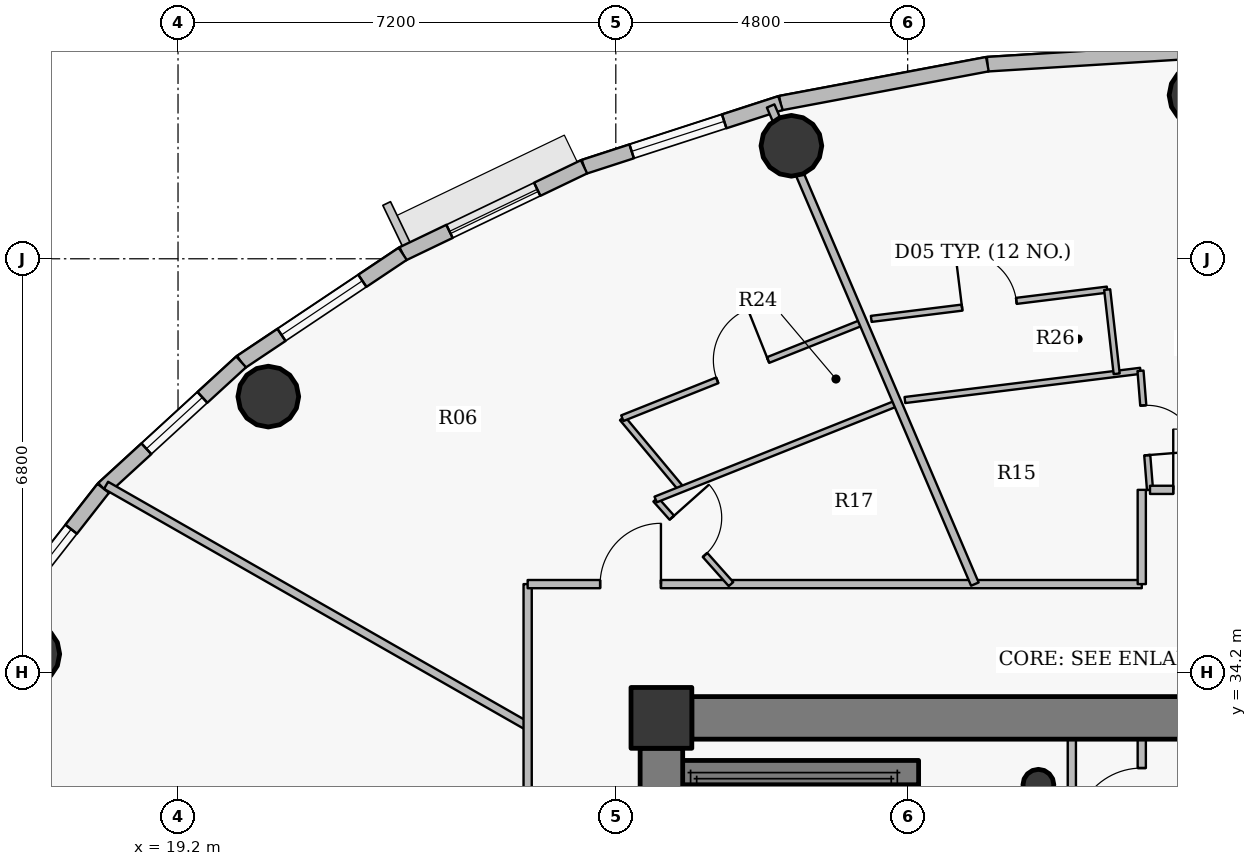
"""IFC4 building model, lengths in metres.
Left out: names, types, materials, properties, quantities, classifications, styles, units other than length and angle.
Written with IfcOpenShell. Run it as: python <this file> out.ifc"""

import sys

from ifc_helpers import new_model, si_unit, direction, frame, frame_2d, origin, origin_2d, place, context, subcontext, project, spatial, rectangle, hollow_circle, extrude, source, transform, mapped, element, fill, save


model = new_model("IFC4")
c1 = context("Model", 3, precision=1e-05, world=origin(), true_north=direction((0.0, 1.0)))
c2 = subcontext(c1, "Body", "Model", "MODEL_VIEW")
j1 = project(units=[si_unit("LENGTHUNIT", "METRE"), si_unit("PLANEANGLEUNIT", "RADIAN")], contexts=[c1])
p1 = place(None, origin())
s1 = spatial("IfcSite", under=j1, at=p1, CompositionType="ELEMENT")
p2 = place(p1, origin())
s2 = spatial("IfcBuilding", under=s1, at=p2, CompositionType="ELEMENT")
p3 = place(p2, frame((0.0, 0.0, 303.0)))
s3 = spatial("IfcBuildingStorey", under=s2, at=p3, CompositionType="ELEMENT", Elevation=303.0)
p4 = place(p3, frame((27.15, 33.45, 0.0), z_axis=(0.0, 0.0, 1.0), x_axis=(1.0, 0.0, 0.0)))
e1 = element("IfcColumn", 1, at=p4, inside=s3, PredefinedType="COLUMN", context=c2, shape_type="SweptSolid", body=[
    extrude(rectangle(XDim=1.0, YDim=1.0, at=origin_2d()), origin(), (0.0, 0.0, 1.0), 3.75),
])
p5 = place(p3, frame((33.35, 32.35, 0.0), z_axis=(0.0, 0.0, 1.0), x_axis=(1.0, 0.0, 0.0)))
e2 = element("IfcColumn", 2, at=p5, inside=s3, PredefinedType="COLUMN", context=c2, shape_type="SweptSolid", body=[
    extrude(hollow_circle(Radius=0.254, WallThickness=0.02, at=origin_2d()), origin(), (0.0, 0.0, 1.0), 3.75),
])
p6 = place(p3, frame((31.18, 27.8, 0.0), z_axis=(0.0, 0.0, 1.0), x_axis=(0.0, 1.0, 0.0)))
e3 = element("IfcWall", 3, at=p6, inside=s3, PredefinedType="SHEAR", context=c2, shape_type="SweptSolid", body=[
    extrude(rectangle(XDim=4.75, YDim=0.4, at=frame_2d((2.375, 0.0))), origin(), (0.0, 0.0, 1.0), 3.75),
])
p7 = place(p3, frame((27.25, 32.55, 0.0), z_axis=(0.0, 0.0, 1.0), x_axis=(1.0, 0.0, 0.0)))
e4 = element("IfcWall", 4, at=p7, inside=s3, PredefinedType="SHEAR", context=c2, shape_type="SweptSolid", body=[
    extrude(rectangle(XDim=4.13, YDim=0.4, at=frame_2d((2.065, 0.0))), origin(), (0.0, 0.0, 1.0), 3.75),
])
p8 = place(p3, frame((27.65, 33.45, 0.0), z_axis=(0.0, 0.0, 1.0), x_axis=(1.0, 0.0, 0.0)))
e5 = element("IfcWall", 5, at=p8, inside=s3, PredefinedType="SHEAR", context=c2, shape_type="SweptSolid", body=[
    extrude(rectangle(XDim=16.7, YDim=0.7, at=frame_2d((8.35, 0.0))), origin(), (0.0, 0.0, 1.0), 3.05),
])
p9 = place(p8, frame((12.775, 0.0, 0.0)))
e6 = element("IfcOpeningElement", 6, at=p9, cuts=e5, PredefinedType="OPENING", context=c2, shape_type="SweptSolid", body=[
    extrude(rectangle(XDim=1.15, YDim=2.15, at=origin_2d()), frame((0.575, 0.36, 1.075), z_axis=(0.0, -1.0, 0.0), x_axis=(1.0, 0.0, 0.0)), (0.0, 0.0, 1.0), 0.72),
])
p10 = place(p3, frame((27.15, 21.05, 0.0), z_axis=(0.0, 0.0, 1.0), x_axis=(0.0, 1.0, 0.0)))
e7 = element("IfcWall", 7, at=p10, inside=s3, PredefinedType="SHEAR", context=c2, shape_type="SweptSolid", body=[
    extrude(rectangle(XDim=11.9, YDim=0.7, at=frame_2d((5.95, 0.0))), origin(), (0.0, 0.0, 1.0), 3.05),
])
for number, where, z_axis, x_axis in (
    (8, (36.0, 43.69, 0.0), (0.0, 0.0, 1.0), (1.0, 0.0, 0.0)),
    (9, (29.288, 42.858, 0.0), (0.0, 0.0, 1.0), (1.0, 0.0, 0.0)),
    (10, (20.685, 38.733, 0.0), (0.0, 0.0, 1.0), (1.0, 0.0, 0.0)),
    (11, (16.754, 34.5, 0.0), (0.0, 0.0, 1.0), (1.0, 0.0, 0.0)),
):
    element("IfcColumn", number, at=place(p3, frame(where, z_axis=z_axis, x_axis=x_axis)), inside=s3, PredefinedType="COLUMN", context=c2, shape_type="SweptSolid", body=[
        extrude(hollow_circle(Radius=0.5, WallThickness=0.032, at=origin_2d()), origin(), (0.0, 0.0, 1.0), 3.75),
    ])
p11 = place(p3, frame((32.511, 44.2, 0.0), z_axis=(0.0, 0.0, 1.0), x_axis=(0.998104946479, 0.061534671648, 0.0)))
e12 = element("IfcWall", 12, at=p11, inside=s3, PredefinedType="SOLIDWALL", context=c2, shape_type="SweptSolid", body=[
    extrude(rectangle(XDim=3.495, YDim=0.24, at=frame_2d((1.748, 0.0))), origin(), (0.0, 0.0, 1.0), 3.5),
])
p12 = place(p3, frame((29.109, 43.56, 0.0), z_axis=(0.0, 0.0, 1.0), x_axis=(0.982782655757, 0.184765395959, 0.0)))
e13 = element("IfcWall", 13, at=p12, inside=s3, PredefinedType="SOLIDWALL", context=c2, shape_type="SweptSolid", body=[
    extrude(rectangle(XDim=3.462, YDim=0.24, at=frame_2d((1.731, 0.0))), origin(), (0.0, 0.0, 1.0), 3.5),
])
p13 = place(p3, frame((25.877, 42.512, 0.0), z_axis=(0.0, 0.0, 1.0), x_axis=(0.95123136723, 0.308478339592, 0.0)))
e14 = element("IfcWall", 14, at=p13, inside=s3, PredefinedType="SOLIDWALL", context=c2, shape_type="SweptSolid", body=[
    extrude(rectangle(XDim=3.398, YDim=0.24, at=frame_2d((1.699, 0.0))), origin(), (0.0, 0.0, 1.0), 3.5),
])
p14 = place(p13, frame((0.824, 0.0, 0.9)))
e15 = element("IfcOpeningElement", 15, at=p14, cuts=e14, PredefinedType="OPENING", context=c2, shape_type="SweptSolid", body=[
    extrude(rectangle(XDim=1.6, YDim=1.75, at=origin_2d()), frame((0.8, 0.13, 0.875), z_axis=(0.0, -1.0, 0.0), x_axis=(1.0, 0.0, 0.0)), (0.0, 0.0, 1.0), 0.26),
])
p15 = place(p3, frame((22.896, 41.082, 0.0), z_axis=(0.0, 0.0, 1.0), x_axis=(0.901573741254, 0.43262546051, 0.0)))
e16 = element("IfcWall", 16, at=p15, inside=s3, PredefinedType="SOLIDWALL", context=c2, shape_type="SweptSolid", body=[
    extrude(rectangle(XDim=3.307, YDim=0.24, at=frame_2d((1.653, 0.0))), origin(), (0.0, 0.0, 1.0), 3.5),
])
p16 = place(p15, frame((0.854, 0.0, 0.9)))
e17 = element("IfcOpeningElement", 17, at=p16, cuts=e16, PredefinedType="OPENING", context=c2, shape_type="SweptSolid", body=[
    extrude(rectangle(XDim=1.6, YDim=1.75, at=origin_2d()), frame((0.8, 0.13, 0.875), z_axis=(0.0, -1.0, 0.0), x_axis=(1.0, 0.0, 0.0)), (0.0, 0.0, 1.0), 0.26),
])
p17 = place(p3, frame((20.238, 39.304, 0.0), z_axis=(0.0, 0.0, 1.0), x_axis=(0.831250592635, 0.55589787933, 0.0)))
e18 = element("IfcWall", 18, at=p17, inside=s3, PredefinedType="SOLIDWALL", context=c2, shape_type="SweptSolid", body=[
    extrude(rectangle(XDim=3.197, YDim=0.24, at=frame_2d((1.599, 0.0))), origin(), (0.0, 0.0, 1.0), 3.5),
])
p18 = place(p17, frame((0.799, 0.0, 0.9)))
e19 = element("IfcOpeningElement", 19, at=p18, cuts=e18, PredefinedType="OPENING", context=c2, shape_type="SweptSolid", body=[
    extrude(rectangle(XDim=1.6, YDim=1.75, at=origin_2d()), frame((0.8, 0.13, 0.875), z_axis=(0.0, -1.0, 0.0), x_axis=(1.0, 0.0, 0.0)), (0.0, 0.0, 1.0), 0.26),
])
p19 = place(p3, frame((17.97, 37.225, 0.0), z_axis=(0.0, 0.0, 1.0), x_axis=(0.737068506972, 0.675818034703, 0.0)))
e20 = element("IfcWall", 20, at=p19, inside=s3, PredefinedType="SOLIDWALL", context=c2, shape_type="SweptSolid", body=[
    extrude(rectangle(XDim=3.077, YDim=0.24, at=frame_2d((1.539, 0.0))), origin(), (0.0, 0.0, 1.0), 3.5),
])
p20 = place(p19, frame((0.963, 0.0, 0.9)))
e21 = element("IfcOpeningElement", 21, at=p20, cuts=e20, PredefinedType="OPENING", context=c2, shape_type="SweptSolid", body=[
    extrude(rectangle(XDim=1.25, YDim=1.65, at=origin_2d()), frame((0.625, 0.13, 0.825), z_axis=(0.0, -1.0, 0.0), x_axis=(1.0, 0.0, 0.0)), (0.0, 0.0, 1.0), 0.26),
])
p21 = place(p3, frame((16.146, 34.895, 0.0), z_axis=(0.0, 0.0, 1.0), x_axis=(0.616337186556, 0.787482363275, 0.0)))
e22 = element("IfcWall", 22, at=p21, inside=s3, PredefinedType="SOLIDWALL", context=c2, shape_type="SweptSolid", body=[
    extrude(rectangle(XDim=2.958, YDim=0.24, at=frame_2d((1.479, 0.0))), origin(), (0.0, 0.0, 1.0), 3.5),
])
p22 = place(p21, frame((0.854, 0.0, 0.9)))
e23 = element("IfcOpeningElement", 23, at=p22, cuts=e22, PredefinedType="OPENING", context=c2, shape_type="SweptSolid", body=[
    extrude(rectangle(XDim=1.25, YDim=1.65, at=origin_2d()), frame((0.625, 0.13, 0.825), z_axis=(0.0, -1.0, 0.0), x_axis=(1.0, 0.0, 0.0)), (0.0, 0.0, 1.0), 0.26),
])
p23 = place(p3, frame((18.016, 37.274, 0.0), z_axis=(0.0, 0.0, 1.0), x_axis=(0.868277005727, -0.496079672357, 0.0)))
e24 = element("IfcWall", 24, at=p23, inside=s3, PredefinedType="PARTITIONING", context=c2, shape_type="SweptSolid", body=[
    extrude(rectangle(XDim=7.985, YDim=0.135, at=frame_2d((3.993, 0.0))), origin(), (0.0, 0.0, 1.0), 2.985),
])
p24 = place(p3, frame((24.95, 31.65, 0.0), z_axis=(0.0, 0.0, 1.0), x_axis=(0.0, 1.0, 0.0)))
e25 = element("IfcWall", 25, at=p24, inside=s3, PredefinedType="PARTITIONING", context=c2, shape_type="SweptSolid", body=[
    extrude(rectangle(XDim=4.0, YDim=0.135, at=frame_2d((2.0, 0.0))), origin(), (0.0, 0.0, 1.0), 3.035),
])
p25 = place(p3, frame((24.95, 35.65, 0.0), z_axis=(0.0, 0.0, 1.0), x_axis=(1.0, 0.0, 0.0)))
e26 = element("IfcWall", 26, at=p25, inside=s3, PredefinedType="PARTITIONING", context=c2, shape_type="SweptSolid", body=[
    extrude(rectangle(XDim=10.1, YDim=0.135, at=frame_2d((5.05, 0.0))), origin(), (0.0, 0.0, 1.0), 3.035),
])
p26 = place(p25, frame((1.192, 0.0, 0.0)))
e27 = element("IfcOpeningElement", 27, at=p26, cuts=e26, PredefinedType="OPENING", context=c2, shape_type="SweptSolid", body=[
    extrude(rectangle(XDim=1.0, YDim=2.15, at=origin_2d()), frame((0.5, 0.078, 1.075), z_axis=(0.0, -1.0, 0.0), x_axis=(1.0, 0.0, 0.0)), (0.0, 0.0, 1.0), 0.155),
])
p27 = place(p3, frame((26.507, 38.378, 0.0), z_axis=(0.0, 0.0, 1.0), x_axis=(0.640626707989, -0.767852473468, 0.0)))
e28 = element("IfcWall", 28, at=p27, inside=s3, PredefinedType="PARTITIONING", context=c2, shape_type="SweptSolid", body=[
    extrude(rectangle(XDim=1.52, YDim=0.1, at=frame_2d((0.76, 0.0))), origin(), (0.0, 0.0, 1.0), 3.5),
])
p28 = place(p3, frame((26.507, 38.378, 0.0), z_axis=(0.0, 0.0, 1.0), x_axis=(0.928788495711, 0.370610213345, 0.0)))
e29 = element("IfcWall", 29, at=p28, inside=s3, PredefinedType="PARTITIONING", context=c2, shape_type="SweptSolid", body=[
    extrude(rectangle(XDim=4.261, YDim=0.1, at=frame_2d((2.131, 0.0))), origin(), (0.0, 0.0, 1.0), 3.035),
])
p29 = place(p28, frame((1.681, 0.0, 0.0)))
e30 = element("IfcOpeningElement", 30, at=p29, cuts=e29, PredefinedType="OPENING", context=c2, shape_type="SweptSolid", body=[
    extrude(rectangle(XDim=0.9, YDim=2.1, at=origin_2d()), frame((0.45, 0.06, 1.05), z_axis=(0.0, -1.0, 0.0), x_axis=(1.0, 0.0, 0.0)), (0.0, 0.0, 1.0), 0.12),
])
p30 = place(p3, frame((27.055, 37.042, 0.0), z_axis=(0.0, 0.0, 1.0), x_axis=(0.665119722178, -0.746736737525, 0.0)))
e31 = element("IfcWall", 31, at=p30, inside=s3, PredefinedType="PARTITIONING", context=c2, shape_type="SweptSolid", body=[
    extrude(rectangle(XDim=1.864, YDim=0.1, at=frame_2d((0.932, 0.0))), origin(), (0.0, 0.0, 1.0), 3.5),
])
p31 = place(p30, frame((0.401, 0.0, 0.0)))
e32 = element("IfcOpeningElement", 32, at=p31, cuts=e31, PredefinedType="OPENING", context=c2, shape_type="SweptSolid", body=[
    extrude(rectangle(XDim=0.82, YDim=2.1, at=origin_2d()), frame((0.41, 0.06, 1.05), z_axis=(0.0, -1.0, 0.0), x_axis=(1.0, 0.0, 0.0)), (0.0, 0.0, 1.0), 0.12),
])
p32 = place(p3, frame((27.055, 37.042, 0.0), z_axis=(0.0, 0.0, 1.0), x_axis=(0.928814416372, 0.370545246819, 0.0)))
e33 = element("IfcWall", 33, at=p32, inside=s3, PredefinedType="PARTITIONING", context=c2, shape_type="SweptSolid", body=[
    extrude(rectangle(XDim=4.283, YDim=0.1, at=frame_2d((2.141, 0.0))), origin(), (0.0, 0.0, 1.0), 3.035),
])
p33 = place(p3, frame((28.946, 43.513, 0.0), z_axis=(0.0, 0.0, 1.0), x_axis=(0.392833513872, -0.919609607594, 0.0)))
e34 = element("IfcWall", 34, at=p33, inside=s3, PredefinedType="PARTITIONING", context=c2, shape_type="SweptSolid", body=[
    extrude(rectangle(XDim=8.55, YDim=0.135, at=frame_2d((4.275, 0.0))), origin(), (0.0, 0.0, 1.0), 3.035),
])
p34 = place(p3, frame((30.601, 40.011, 0.0), z_axis=(0.0, 0.0, 1.0), x_axis=(0.992391758007, 0.123120260886, 0.0)))
e35 = element("IfcWall", 35, at=p34, inside=s3, PredefinedType="PARTITIONING", context=c2, shape_type="SweptSolid", body=[
    extrude(rectangle(XDim=3.91, YDim=0.1, at=frame_2d((1.955, 0.0))), origin(), (0.0, 0.0, 1.0), 3.035),
])
p35 = place(p34, frame((1.505, 0.0, 0.0)))
e36 = element("IfcOpeningElement", 36, at=p35, cuts=e35, PredefinedType="OPENING", context=c2, shape_type="SweptSolid", body=[
    extrude(rectangle(XDim=0.9, YDim=2.1, at=origin_2d()), frame((0.45, 0.06, 1.05), z_axis=(0.0, -1.0, 0.0), x_axis=(1.0, 0.0, 0.0)), (0.0, 0.0, 1.0), 0.12),
])
p36 = place(p3, frame((31.155, 38.677, 0.0), z_axis=(0.0, 0.0, 1.0), x_axis=(0.992398620659, 0.123064932921, 0.0)))
e37 = element("IfcWall", 37, at=p36, inside=s3, PredefinedType="PARTITIONING", context=c2, shape_type="SweptSolid", body=[
    extrude(rectangle(XDim=3.904, YDim=0.1, at=frame_2d((1.952, 0.0))), origin(), (0.0, 0.0, 1.0), 3.035),
])
p37 = place(p3, frame((33.9, 27.56, 0.0), z_axis=(0.0, 0.0, 1.0), x_axis=(0.0, 1.0, 0.0)))
e38 = element("IfcWall", 38, at=p37, inside=s3, PredefinedType="PARTITIONING", context=c2, shape_type="SweptSolid", body=[
    extrude(rectangle(XDim=5.54, YDim=0.135, at=frame_2d((2.77, 0.0))), origin(), (0.0, 0.0, 1.0), 3.085),
])
p38 = place(p37, frame((0.665, 0.0, 0.0)))
e39 = element("IfcOpeningElement", 39, at=p38, cuts=e38, PredefinedType="OPENING", context=c2, shape_type="SweptSolid", body=[
    extrude(rectangle(XDim=1.1, YDim=2.15, at=origin_2d()), frame((0.55, 0.078, 1.075), z_axis=(0.0, -1.0, 0.0), x_axis=(1.0, 0.0, 0.0)), (0.0, 0.0, 1.0), 0.155),
])
p39 = place(p37, frame((3.117, 0.0, 0.0)))
e40 = element("IfcOpeningElement", 40, at=p39, cuts=e38, PredefinedType="OPENING", context=c2, shape_type="SweptSolid", body=[
    extrude(rectangle(XDim=1.1, YDim=2.15, at=origin_2d()), frame((0.55, 0.078, 1.075), z_axis=(0.0, -1.0, 0.0), x_axis=(1.0, 0.0, 0.0)), (0.0, 0.0, 1.0), 0.155),
])
p40 = place(p3, frame((34.481, 40.493, 0.0), z_axis=(0.0, 0.0, 1.0), x_axis=(0.111835884353, -0.993726690278, 0.0)))
e41 = element("IfcWall", 41, at=p40, inside=s3, PredefinedType="PARTITIONING", context=c2, shape_type="SweptSolid", body=[
    extrude(rectangle(XDim=1.393, YDim=0.1, at=frame_2d((0.696, 0.0))), origin(), (0.0, 0.0, 1.0), 3.125),
])
p41 = place(p3, frame((35.029, 39.158, 0.0), z_axis=(0.0, 0.0, 1.0), x_axis=(0.079557473452, -0.996830280649, 0.0)))
e42 = element("IfcWall", 42, at=p41, inside=s3, PredefinedType="PARTITIONING", context=c2, shape_type="SweptSolid", body=[
    extrude(rectangle(XDim=1.964, YDim=0.1, at=frame_2d((0.982, 0.0))), origin(), (0.0, 0.0, 1.0), 3.5),
])
p42 = place(p41, frame((0.572, 0.0, 0.0)))
e43 = element("IfcOpeningElement", 43, at=p42, cuts=e42, PredefinedType="OPENING", context=c2, shape_type="SweptSolid", body=[
    extrude(rectangle(XDim=0.82, YDim=2.1, at=origin_2d()), frame((0.41, 0.06, 1.05), z_axis=(0.0, -1.0, 0.0), x_axis=(1.0, 0.0, 0.0)), (0.0, 0.0, 1.0), 0.12),
])
p43 = place(p3, frame((35.05, 31.05, 0.0), z_axis=(0.0, 0.0, 1.0), x_axis=(0.0, 1.0, 0.0)))
e44 = element("IfcWall", 44, at=p43, inside=s3, PredefinedType="PARTITIONING", context=c2, shape_type="SweptSolid", body=[
    extrude(rectangle(XDim=2.05, YDim=0.135, at=frame_2d((1.025, 0.0))), origin(), (0.0, 0.0, 1.0), 3.085),
])
p44 = place(p43, frame((0.475, 0.0, 0.0)))
e45 = element("IfcOpeningElement", 45, at=p44, cuts=e44, PredefinedType="OPENING", context=c2, shape_type="SweptSolid", body=[
    extrude(rectangle(XDim=1.1, YDim=2.15, at=origin_2d()), frame((0.55, 0.078, 1.075), z_axis=(0.0, -1.0, 0.0), x_axis=(1.0, 0.0, 0.0)), (0.0, 0.0, 1.0), 0.155),
])
p45 = place(p3, frame((35.05, 35.65, 0.0), z_axis=(0.0, 0.0, 1.0), x_axis=(0.0, 1.0, 0.0)))
e46 = element("IfcWall", 46, at=p45, inside=s3, PredefinedType="PARTITIONING", context=c2, shape_type="SweptSolid", body=[
    extrude(rectangle(XDim=1.55, YDim=0.135, at=frame_2d((0.775, 0.0))), origin(), (0.0, 0.0, 1.0), 3.5),
])
p46 = place(p3, frame((35.186, 37.2, 0.0), z_axis=(0.0, 0.0, 1.0), x_axis=(1.0, 0.0, 0.0)))
e47 = element("IfcWall", 47, at=p46, inside=s3, PredefinedType="PARTITIONING", context=c2, shape_type="SweptSolid", body=[
    extrude(rectangle(XDim=1.764, YDim=0.135, at=frame_2d((0.882, 0.0))), origin(), (0.0, 0.0, 1.0), 3.035),
])
p47 = place(p46, frame((0.382, 0.0, 0.0)))
e48 = element("IfcOpeningElement", 48, at=p47, cuts=e47, PredefinedType="OPENING", context=c2, shape_type="SweptSolid", body=[
    extrude(rectangle(XDim=1.0, YDim=2.15, at=origin_2d()), frame((0.5, 0.078, 1.075), z_axis=(0.0, -1.0, 0.0), x_axis=(1.0, 0.0, 0.0)), (0.0, 0.0, 1.0), 0.155),
])
p48 = place(p3, frame((27.64, 33.8, 0.0), z_axis=(0.0, 0.0, 1.0), x_axis=(-1.0, 0.0, 0.0)))
e49 = element("IfcWall", 49, at=p48, inside=s3, PredefinedType="PARTITIONING", context=c2, shape_type="SweptSolid", body=[
    extrude(rectangle(XDim=0.84, YDim=0.135, at=frame_2d((0.42, 0.0))), origin(), (0.0, 0.0, 1.0), 3.035),
])
p49 = place(p3, frame((26.8, 33.492, 0.0), z_axis=(0.0, 0.0, 1.0), x_axis=(0.0, -1.0, 0.0)))
e50 = element("IfcWall", 50, at=p49, inside=s3, PredefinedType="PARTITIONING", context=c2, shape_type="SweptSolid", body=[
    extrude(rectangle(XDim=0.532, YDim=0.135, at=frame_2d((0.266, 0.0))), origin(), (0.0, 0.0, 1.0), 3.5),
])
m1 = source(origin(), c2, "Body", "SweptSolid", [
    extrude(rectangle(XDim=1.6, YDim=1.75, at=origin_2d()), frame((0.8, 0.03, 0.875), z_axis=(0.0, -1.0, 0.0), x_axis=(1.0, 0.0, 0.0)), (0.0, 0.0, 1.0), 0.06),
])
p50 = place(p14, origin())
e51 = element("IfcWindow", 51, at=p50, inside=s3, PartitioningType="DOUBLE_PANEL_VERTICAL", PredefinedType="WINDOW", context=c2, shape_type="MappedRepresentation", body=[
    mapped(m1, transform((0.0, 0.0, 0.0), x_axis=(1.0, 0.0, 0.0), y_axis=(0.0, 1.0, 0.0), z_axis=(0.0, 0.0, 1.0), scale=1.0)),
])
fill(e15, e51)
p51 = place(p16, origin())
e52 = element("IfcWindow", 52, at=p51, inside=s3, PartitioningType="DOUBLE_PANEL_VERTICAL", PredefinedType="WINDOW", context=c2, shape_type="MappedRepresentation", body=[
    mapped(m1, transform((0.0, 0.0, 0.0), x_axis=(1.0, 0.0, 0.0), y_axis=(0.0, 1.0, 0.0), z_axis=(0.0, 0.0, 1.0), scale=1.0)),
])
fill(e17, e52)
p52 = place(p18, origin())
e53 = element("IfcWindow", 53, at=p52, inside=s3, PartitioningType="DOUBLE_PANEL_VERTICAL", PredefinedType="WINDOW", context=c2, shape_type="MappedRepresentation", body=[
    mapped(m1, transform((0.0, 0.0, 0.0), x_axis=(1.0, 0.0, 0.0), y_axis=(0.0, 1.0, 0.0), z_axis=(0.0, 0.0, 1.0), scale=1.0)),
])
fill(e19, e53)
m2 = source(origin(), c2, "Body", "SweptSolid", [
    extrude(rectangle(XDim=1.25, YDim=1.65, at=origin_2d()), frame((0.625, 0.03, 0.825), z_axis=(0.0, -1.0, 0.0), x_axis=(1.0, 0.0, 0.0)), (0.0, 0.0, 1.0), 0.06),
])
p53 = place(p20, origin())
e54 = element("IfcWindow", 54, at=p53, inside=s3, PartitioningType="SINGLE_PANEL", PredefinedType="WINDOW", context=c2, shape_type="MappedRepresentation", body=[
    mapped(m2, transform((0.0, 0.0, 0.0), x_axis=(1.0, 0.0, 0.0), y_axis=(0.0, 1.0, 0.0), z_axis=(0.0, 0.0, 1.0), scale=1.0)),
])
fill(e21, e54)
p54 = place(p22, origin())
e55 = element("IfcWindow", 55, at=p54, inside=s3, PartitioningType="SINGLE_PANEL", PredefinedType="WINDOW", context=c2, shape_type="MappedRepresentation", body=[
    mapped(m2, transform((0.0, 0.0, 0.0), x_axis=(1.0, 0.0, 0.0), y_axis=(0.0, 1.0, 0.0), z_axis=(0.0, 0.0, 1.0), scale=1.0)),
])
fill(e23, e55)
m3 = source(origin(), c2, "Body", "SweptSolid", [
    extrude(rectangle(XDim=1.0, YDim=2.15, at=origin_2d()), frame((0.5, 0.025, 1.075), z_axis=(0.0, -1.0, 0.0), x_axis=(1.0, 0.0, 0.0)), (0.0, 0.0, 1.0), 0.05),
])
p55 = place(p47, origin())
e56 = element("IfcDoor", 56, at=p55, inside=s3, OperationType="SINGLE_SWING_LEFT", PredefinedType="DOOR", context=c2, shape_type="MappedRepresentation", body=[
    mapped(m3, transform((0.0, 0.0, 0.0), x_axis=(1.0, 0.0, 0.0), y_axis=(0.0, 1.0, 0.0), z_axis=(0.0, 0.0, 1.0), scale=1.0)),
])
fill(e48, e56)
m4 = source(origin(), c2, "Body", "SweptSolid", [
    extrude(rectangle(XDim=0.82, YDim=2.1, at=origin_2d()), frame((0.41, 0.025, 1.05), z_axis=(0.0, -1.0, 0.0), x_axis=(1.0, 0.0, 0.0)), (0.0, 0.0, 1.0), 0.05),
])
p56 = place(p42, origin())
e57 = element("IfcDoor", 57, at=p56, inside=s3, OperationType="SINGLE_SWING_RIGHT", PredefinedType="DOOR", context=c2, shape_type="MappedRepresentation", body=[
    mapped(m4, transform((0.0, 0.0, 0.0), x_axis=(1.0, 0.0, 0.0), y_axis=(0.0, 1.0, 0.0), z_axis=(0.0, 0.0, 1.0), scale=1.0)),
])
fill(e43, e57)
m5 = source(origin(), c2, "Body", "SweptSolid", [
    extrude(rectangle(XDim=0.9, YDim=2.1, at=origin_2d()), frame((0.45, 0.025, 1.05), z_axis=(0.0, -1.0, 0.0), x_axis=(1.0, 0.0, 0.0)), (0.0, 0.0, 1.0), 0.05),
])
p57 = place(p35, origin())
e58 = element("IfcDoor", 58, at=p57, inside=s3, OperationType="SINGLE_SWING_LEFT", PredefinedType="DOOR", context=c2, shape_type="MappedRepresentation", body=[
    mapped(m5, transform((0.0, 0.0, 0.0), x_axis=(1.0, 0.0, 0.0), y_axis=(0.0, 1.0, 0.0), z_axis=(0.0, 0.0, 1.0), scale=1.0)),
])
fill(e36, e58)
p58 = place(p26, origin())
e59 = element("IfcDoor", 59, at=p58, inside=s3, OperationType="SINGLE_SWING_RIGHT", PredefinedType="DOOR", context=c2, shape_type="MappedRepresentation", body=[
    mapped(m3, transform((0.0, 0.0, 0.0), x_axis=(1.0, 0.0, 0.0), y_axis=(0.0, 1.0, 0.0), z_axis=(0.0, 0.0, 1.0), scale=1.0)),
])
fill(e27, e59)
p59 = place(p31, origin())
e60 = element("IfcDoor", 60, at=p59, inside=s3, OperationType="SINGLE_SWING_LEFT", PredefinedType="DOOR", context=c2, shape_type="MappedRepresentation", body=[
    mapped(m4, transform((0.0, 0.0, 0.0), x_axis=(1.0, 0.0, 0.0), y_axis=(0.0, 1.0, 0.0), z_axis=(0.0, 0.0, 1.0), scale=1.0)),
])
fill(e32, e60)
p60 = place(p29, origin())
e61 = element("IfcDoor", 61, at=p60, inside=s3, OperationType="SINGLE_SWING_RIGHT", PredefinedType="DOOR", context=c2, shape_type="MappedRepresentation", body=[
    mapped(m5, transform((0.0, 0.0, 0.0), x_axis=(1.0, 0.0, 0.0), y_axis=(0.0, 1.0, 0.0), z_axis=(0.0, 0.0, 1.0), scale=1.0)),
])
fill(e30, e61)
m6 = source(origin(), c2, "Body", "SweptSolid", [
    extrude(rectangle(XDim=1.1, YDim=2.15, at=origin_2d()), frame((0.55, 0.025, 1.075), z_axis=(0.0, -1.0, 0.0), x_axis=(1.0, 0.0, 0.0)), (0.0, 0.0, 1.0), 0.05),
])
p61 = place(p44, origin())
e62 = element("IfcDoor", 62, at=p61, inside=s3, OperationType="SINGLE_SWING_LEFT", PredefinedType="DOOR", context=c2, shape_type="MappedRepresentation", body=[
    mapped(m6, transform((0.0, 0.0, 0.0), x_axis=(1.0, 0.0, 0.0), y_axis=(0.0, 1.0, 0.0), z_axis=(0.0, 0.0, 1.0), scale=1.0)),
])
fill(e45, e62)
save(model, sys.argv[1])
